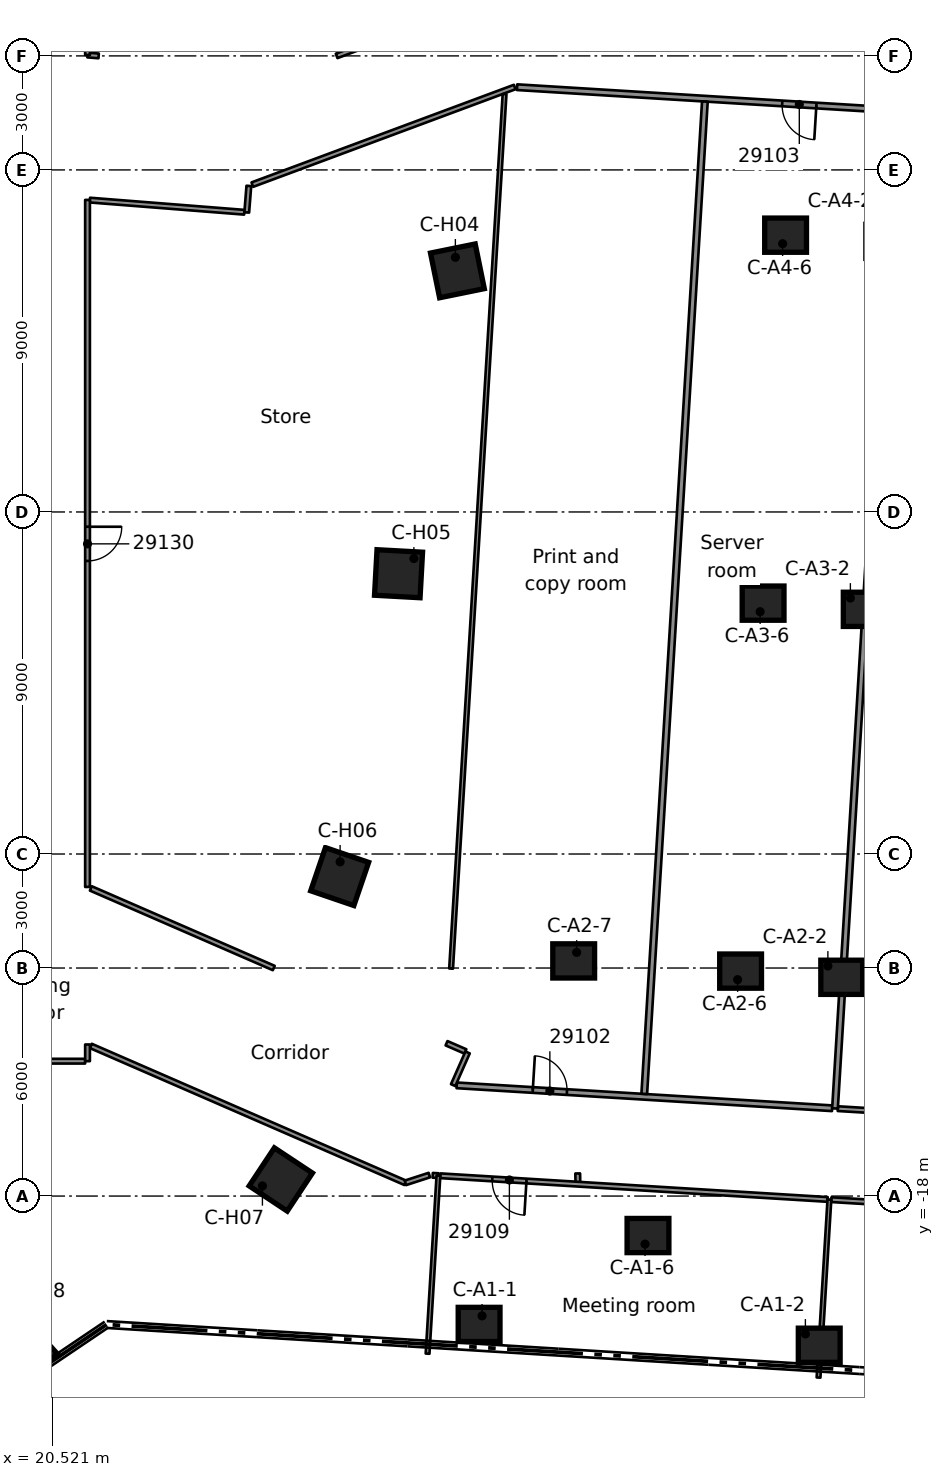
"""IFC4 building model, lengths in metres.
Left out: names, types, materials, properties, quantities, classifications, styles, units other than length and angle.
Written with IfcOpenShell. Run it as: python <this file> out.ifc"""

import sys

from ifc_helpers import new_model, si_unit, direction, frame, frame_2d, origin, origin_2d, place, context, subcontext, project, spatial, rectangle, extrude, element, fill, save


model = new_model("IFC4")
c1 = context("Model", 3, precision=1e-05, world=origin(), true_north=direction((0.0, 1.0)))
c2 = subcontext(c1, "Body", "Model", "MODEL_VIEW")
j1 = project(units=[si_unit("LENGTHUNIT", "METRE"), si_unit("PLANEANGLEUNIT", "RADIAN")], contexts=[c1])
p1 = place(None, origin())
s1 = spatial("IfcSite", under=j1, at=p1, CompositionType="ELEMENT")
p2 = place(p1, origin())
s2 = spatial("IfcBuilding", under=s1, at=p2, CompositionType="ELEMENT")
p3 = place(p2, frame((0.0, 0.0, 149.1)))
s3 = spatial("IfcBuildingStorey", under=s2, at=p3, CompositionType="ELEMENT", Elevation=149.1)
for number, where, z_axis, x_axis in (
    (1, (31.754, -21.378, 0.0), (0.0, 0.0, 1.0), (1.0, 0.0, 0.0)),
    (2, (40.704, -21.926, 0.0), (0.0, 0.0, 1.0), (1.0, 0.0, 0.0)),
    (3, (36.198, -19.039, 0.0), (0.0, 0.0, 1.0), (1.0, 0.0, 0.0)),
    (4, (41.296, -12.244, 0.0), (0.0, 0.0, 1.0), (1.0, 0.0, 0.0)),
    (5, (38.635, -12.081, 0.0), (0.0, 0.0, 1.0), (1.0, 0.0, 0.0)),
    (6, (34.243, -11.813, 0.0), (0.0, 0.0, 1.0), (1.0, 0.0, 0.0)),
    (7, (41.888, -2.562, 0.0), (0.0, 0.0, 1.0), (1.0, 0.0, 0.0)),
    (8, (39.227, -2.399, 0.0), (0.0, 0.0, 1.0), (1.0, 0.0, 0.0)),
    (9, (39.819, 7.283, 0.0), (0.0, 0.0, 1.0), (1.0, 0.0, 0.0)),
):
    element("IfcColumn", number, at=place(p3, frame(where, z_axis=z_axis, x_axis=x_axis)), inside=s3, PredefinedType="COLUMN", context=c2, shape_type="SweptSolid", body=[
        extrude(rectangle(XDim=1.1, YDim=0.9, at=origin_2d()), origin(), (0.0, 0.0, 1.0), 3.5),
    ])
for number, where, z_axis, x_axis in (
    (10, (31.183, 6.344, 0.0), (0.0, 0.0, 1.0), (0.98, 0.199, 0.0)),
    (11, (29.634, -1.625, 0.0), (0.0, 0.0, 1.0), (0.998, -0.055, 0.0)),
    (12, (28.085, -9.594, 0.0), (0.0, 0.0, 1.0), (0.946, -0.323, 0.0)),
    (13, (26.536, -17.564, 0.0), (0.0, 0.0, 1.0), (0.834, -0.552, 0.0)),
    (14, (19.806, -22.104, 0.0), (0.0, 0.0, 1.0), (0.667, -0.745, 0.0)),
):
    element("IfcColumn", number, at=place(p3, frame(where, z_axis=z_axis, x_axis=x_axis)), inside=s3, PredefinedType="COLUMN", context=c2, shape_type="SweptSolid", body=[
        extrude(rectangle(XDim=1.2, YDim=1.2, at=origin_2d()), origin(), (0.0, 0.0, 1.0), 3.5),
    ])
p4 = place(p3, frame((34.349, -17.405, 0.0), z_axis=(0.0, 0.0, 1.0), x_axis=(0.017313421844, -0.999850111479, 0.0)))
e15 = element("IfcWall", 15, at=p4, inside=s3, PredefinedType="PARTITIONING", context=c2, shape_type="SweptSolid", body=[
    extrude(rectangle(XDim=0.282, YDim=0.125, at=frame_2d((0.141, 0.0))), origin(), (0.0, 0.0, 1.0), 3.08),
])
p5 = place(p3, frame((21.537, -14.05, 0.0), z_axis=(0.0, 0.0, 1.0), x_axis=(0.916891955624, -0.399135492924, 0.0)))
e16 = element("IfcWall", 16, at=p5, inside=s3, PredefinedType="PARTITIONING", context=c2, shape_type="SweptSolid", body=[
    extrude(rectangle(XDim=9.027, YDim=0.125, at=frame_2d((4.514, 0.0))), origin(), (0.0, 0.0, 1.0), 3.08),
])
p6 = place(p3, frame((21.537, -9.905, 0.0), z_axis=(0.0, 0.0, 1.0), x_axis=(0.916934710252, -0.39903726284, 0.0)))
e17 = element("IfcWall", 17, at=p6, inside=s3, PredefinedType="PARTITIONING", context=c2, shape_type="SweptSolid", body=[
    extrude(rectangle(XDim=5.25, YDim=0.125, at=frame_2d((2.625, 0.0))), origin(), (0.0, 0.0, 1.0), 3.08),
])
p7 = place(p3, frame((30.897, -13.979, 0.0), z_axis=(0.0, 0.0, 1.0), x_axis=(0.917105858988, -0.398643755012, 0.0)))
e18 = element("IfcWall", 18, at=p7, inside=s3, PredefinedType="PARTITIONING", context=c2, shape_type="SweptSolid", body=[
    extrude(rectangle(XDim=0.542, YDim=0.125, at=frame_2d((0.271, 0.0))), origin(), (0.0, 0.0, 1.0), 3.08),
])
p8 = place(p3, frame((21.512, 8.206, 0.0), z_axis=(0.0, 0.0, 1.0), x_axis=(0.996912969239, -0.07851453218, 0.0)))
e19 = element("IfcWall", 19, at=p8, inside=s3, PredefinedType="PARTITIONING", context=c2, shape_type="SweptSolid", body=[
    extrude(rectangle(XDim=4.077, YDim=0.125, at=frame_2d((2.038, 0.0))), origin(), (0.0, 0.0, 1.0), 3.08),
])
p9 = place(p3, frame((21.45, 12.023, 0.0), z_axis=(0.0, 0.0, 1.0), x_axis=(0.996945992079, -0.078094102713, 0.0)))
e20 = element("IfcWall", 20, at=p9, inside=s3, PredefinedType="PARTITIONING", context=c2, shape_type="SweptSolid", body=[
    extrude(rectangle(XDim=0.294, YDim=0.125, at=frame_2d((0.147, 0.0))), origin(), (0.0, 0.0, 1.0), 3.08),
])
p10 = place(p3, frame((30.533, -17.454, 0.0), z_axis=(0.0, 0.0, 1.0), x_axis=(0.998313083069, -0.058060211616, 0.0)))
e21 = element("IfcWall", 21, at=p10, inside=s3, PredefinedType="PARTITIONING", context=c2, shape_type="SweptSolid", body=[
    extrude(rectangle(XDim=0.151, YDim=0.125, at=frame_2d((0.076, 0.0))), origin(), (0.0, 0.0, 1.0), 3.08),
])
p11 = place(p3, frame((41.022, -18.095, 0.0), z_axis=(0.0, 0.0, 1.0), x_axis=(0.9981427784, -0.060917927811, 0.0)))
e22 = element("IfcWall", 22, at=p11, inside=s3, PredefinedType="PARTITIONING", context=c2, shape_type="SweptSolid", body=[
    extrude(rectangle(XDim=1.447, YDim=0.125, at=frame_2d((0.723, 0.0))), origin(), (0.0, 0.0, 1.0), 3.08),
])
p12 = place(p3, frame((40.923, -18.089, 0.0), z_axis=(0.0, 0.0, 1.0), x_axis=(-0.998135704692, 0.06103372034, 0.0)))
e23 = element("IfcWall", 23, at=p12, inside=s3, PredefinedType="PARTITIONING", context=c2, shape_type="SweptSolid", body=[
    extrude(rectangle(XDim=10.208, YDim=0.125, at=frame_2d((5.104, 0.0))), origin(), (0.0, 0.0, 1.0), 3.08),
])
p13 = place(p12, frame((7.938, 0.0, 0.0)))
e24 = element("IfcOpeningElement", 24, at=p13, cuts=e23, PredefinedType="OPENING", context=c2, shape_type="SweptSolid", body=[
    extrude(rectangle(XDim=0.9, YDim=2.1, at=frame_2d((0.45, 1.05))), frame((0.0, 0.073, 0.0), z_axis=(0.0, -1.0, 0.0), x_axis=(1.0, 0.0, 0.0)), (0.0, 0.0, 1.0), 0.145),
])
p14 = place(p3, frame((41.194, -15.7, 0.0), z_axis=(0.0, 0.0, 1.0), x_axis=(0.998175067926, -0.060386536338, 0.0)))
e25 = element("IfcWall", 25, at=p14, inside=s3, PredefinedType="PARTITIONING", context=c2, shape_type="SweptSolid", body=[
    extrude(rectangle(XDim=1.358, YDim=0.125, at=frame_2d((0.679, 0.0))), origin(), (0.0, 0.0, 1.0), 3.08),
])
p15 = place(p3, frame((31.165, -15.087, 0.0), z_axis=(0.0, 0.0, 1.0), x_axis=(0.998142132741, -0.060928506027, 0.0)))
e26 = element("IfcWall", 26, at=p15, inside=s3, PredefinedType="PARTITIONING", context=c2, shape_type="SweptSolid", body=[
    extrude(rectangle(XDim=9.897, YDim=0.15, at=frame_2d((4.949, 0.0))), origin(), (0.0, 0.0, 1.0), 3.08),
])
p16 = place(p15, frame((2.006, 0.0, 0.0)))
e27 = element("IfcOpeningElement", 27, at=p16, cuts=e26, PredefinedType="OPENING", context=c2, shape_type="SweptSolid", body=[
    extrude(rectangle(XDim=0.9, YDim=2.1, at=frame_2d((0.45, 1.05))), frame((0.0, 0.085, 0.0), z_axis=(0.0, -1.0, 0.0), x_axis=(1.0, 0.0, 0.0)), (0.0, 0.0, 1.0), 0.17),
])
p17 = place(p3, frame((44.16, 10.478, 0.0), z_axis=(0.0, 0.0, 1.0), x_axis=(-0.998127894331, 0.061161315872, 0.0)))
e28 = element("IfcWall", 28, at=p17, inside=s3, PredefinedType="PARTITIONING", context=c2, shape_type="SweptSolid", body=[
    extrude(rectangle(XDim=11.428, YDim=0.15, at=frame_2d((5.714, 0.0))), origin(), (0.0, 0.0, 1.0), 3.08),
])
p18 = place(p17, frame((3.538, 0.0, 0.0)))
e29 = element("IfcOpeningElement", 29, at=p18, cuts=e28, PredefinedType="OPENING", context=c2, shape_type="SweptSolid", body=[
    extrude(rectangle(XDim=0.9, YDim=2.1, at=frame_2d((0.45, 1.05))), frame((0.0, 0.085, 0.0), z_axis=(0.0, -1.0, 0.0), x_axis=(1.0, 0.0, 0.0)), (0.0, 0.0, 1.0), 0.17),
])
p19 = place(p3, frame((21.387, -14.451, 0.0), z_axis=(0.0, 0.0, 1.0), x_axis=(-1.0, 0.0, 0.0)))
e30 = element("IfcWall", 30, at=p19, inside=s3, PredefinedType="PARTITIONING", context=c2, shape_type="SweptSolid", body=[
    extrude(rectangle(XDim=10.996, YDim=0.125, at=frame_2d((5.498, 0.0))), origin(), (0.0, 0.0, 1.0), 3.08),
])
p20 = place(p19, frame((5.038, 0.0, 0.0)))
e31 = element("IfcOpeningElement", 31, at=p20, cuts=e30, PredefinedType="OPENING", context=c2, shape_type="SweptSolid", body=[
    extrude(rectangle(XDim=0.9, YDim=2.1, at=frame_2d((0.45, 1.05))), frame((0.0, 0.073, 0.0), z_axis=(0.0, -1.0, 0.0), x_axis=(1.0, 0.0, 0.0)), (0.0, 0.0, 1.0), 0.145),
])
p21 = place(p3, frame((25.787, 8.613, 0.0), z_axis=(0.0, 0.0, 1.0), x_axis=(0.937265679677, 0.348615899952, 0.0)))
e32 = element("IfcWall", 32, at=p21, inside=s3, PredefinedType="PARTITIONING", context=c2, shape_type="SweptSolid", body=[
    extrude(rectangle(XDim=7.366, YDim=0.125, at=frame_2d((3.683, 0.0))), origin(), (0.0, 0.0, 1.0), 3.08),
])
p22 = place(p3, frame((28.005, 12.0, 0.0), z_axis=(0.0, 0.0, 1.0), x_axis=(0.937179389565, 0.348847806034, 0.0)))
e33 = element("IfcWall", 33, at=p22, inside=s3, PredefinedType="PARTITIONING", context=c2, shape_type="SweptSolid", body=[
    extrude(rectangle(XDim=3.541, YDim=0.125, at=frame_2d((1.77, 0.0))), origin(), (0.0, 0.0, 1.0), 3.08),
])
p23 = place(p3, frame((31.071, -15.081, 0.0), z_axis=(0.0, 0.0, 1.0), x_axis=(0.404017334041, 0.914751328938, 0.0)))
e34 = element("IfcWall", 34, at=p23, inside=s3, PredefinedType="PARTITIONING", context=c2, shape_type="SweptSolid", body=[
    extrude(rectangle(XDim=0.94, YDim=0.125, at=frame_2d((0.47, 0.0))), origin(), (0.0, 0.0, 1.0), 3.08),
])
p24 = place(p3, frame((29.814, -17.653, 0.0), z_axis=(0.0, 0.0, 1.0), x_axis=(0.951047586281, 0.30904447678, 0.0)))
e35 = element("IfcWall", 35, at=p24, inside=s3, PredefinedType="PARTITIONING", context=c2, shape_type="SweptSolid", body=[
    extrude(rectangle(XDim=0.664, YDim=0.125, at=frame_2d((0.332, 0.0))), origin(), (0.0, 0.0, 1.0), 3.08),
])
p25 = place(p3, frame((25.64, 7.881, 0.0), z_axis=(0.0, 0.0, 1.0), x_axis=(0.078802794934, 0.996890224403, 0.0)))
e36 = element("IfcWall", 36, at=p25, inside=s3, PredefinedType="PARTITIONING", context=c2, shape_type="SweptSolid", body=[
    extrude(rectangle(XDim=0.7, YDim=0.125, at=frame_2d((0.35, 0.0))), origin(), (0.0, 0.0, 1.0), 3.08),
])
p26 = place(p3, frame((40.686, -22.776, 0.0), z_axis=(0.0, 0.0, 1.0), x_axis=(0.060923886766, 0.998142414699, 0.0)))
e37 = element("IfcWall", 37, at=p26, inside=s3, PredefinedType="PARTITIONING", context=c2, shape_type="SweptSolid", body=[
    extrude(rectangle(XDim=4.693, YDim=0.1, at=frame_2d((2.346, 0.0))), origin(), (0.0, 0.0, 1.0), 3.08),
])
p27 = place(p3, frame((41.119, -15.695, 0.0), z_axis=(0.0, 0.0, 1.0), x_axis=(0.061026057913, 0.998136173203, 0.0)))
e38 = element("IfcWall", 38, at=p27, inside=s3, PredefinedType="PARTITIONING", context=c2, shape_type="SweptSolid", body=[
    extrude(rectangle(XDim=26.236, YDim=0.15, at=frame_2d((13.118, 0.0))), origin(), (0.0, 0.0, 1.0), 3.08),
])
p28 = place(p3, frame((36.1, -15.313, 0.0), z_axis=(0.0, 0.0, 1.0), x_axis=(0.060968133748, 0.998139713, 0.0)))
e39 = element("IfcWall", 39, at=p28, inside=s3, PredefinedType="PARTITIONING", context=c2, shape_type="SweptSolid", body=[
    extrude(rectangle(XDim=26.161, YDim=0.15, at=frame_2d((13.08, 0.0))), origin(), (0.0, 0.0, 1.0), 3.08),
])
p29 = place(p3, frame((30.398, -22.147, 0.0), z_axis=(0.0, 0.0, 1.0), x_axis=(0.060972554319, 0.998139442974, 0.0)))
e40 = element("IfcWall", 40, at=p29, inside=s3, PredefinedType="PARTITIONING", context=c2, shape_type="SweptSolid", body=[
    extrude(rectangle(XDim=4.693, YDim=0.1, at=frame_2d((2.346, 0.0))), origin(), (0.0, 0.0, 1.0), 3.08),
])
p30 = place(p3, frame((31.017, -12.015, 0.0), z_axis=(0.0, 0.0, 1.0), x_axis=(0.061035772494, 0.998135579206, 0.0)))
e41 = element("IfcWall", 41, at=p30, inside=s3, PredefinedType="PARTITIONING", context=c2, shape_type="SweptSolid", body=[
    extrude(rectangle(XDim=23.052, YDim=0.1, at=frame_2d((11.526, 0.0))), origin(), (0.0, 0.0, 1.0), 3.08),
])
p31 = place(p3, frame((21.45, -14.451, 0.0), z_axis=(0.0, 0.0, 1.0), x_axis=(0.0, 1.0, 0.0)))
e42 = element("IfcWall", 42, at=p31, inside=s3, PredefinedType="PARTITIONING", context=c2, shape_type="SweptSolid", body=[
    extrude(rectangle(XDim=0.439, YDim=0.125, at=frame_2d((0.219, 0.0))), origin(), (0.0, 0.0, 1.0), 3.08),
])
p32 = place(p3, frame((21.45, 8.211, 0.0), z_axis=(0.0, 0.0, 1.0), x_axis=(0.0, -1.0, 0.0)))
e43 = element("IfcWall", 43, at=p32, inside=s3, PredefinedType="PARTITIONING", context=c2, shape_type="SweptSolid", body=[
    extrude(rectangle(XDim=18.078, YDim=0.125, at=frame_2d((9.039, 0.0))), origin(), (0.0, 0.0, 1.0), 3.08),
])
p33 = place(p32, frame((8.6, 0.0, 0.0)))
e44 = element("IfcOpeningElement", 44, at=p33, cuts=e43, PredefinedType="OPENING", context=c2, shape_type="SweptSolid", body=[
    extrude(rectangle(XDim=0.9, YDim=2.1, at=frame_2d((0.45, 1.05))), frame((0.0, 0.073, 0.0), z_axis=(0.0, -1.0, 0.0), x_axis=(1.0, 0.0, 0.0)), (0.0, 0.0, 1.0), 0.145),
])
p34 = place(p3, frame((21.45, 12.023, 0.0), z_axis=(0.0, 0.0, 1.0), x_axis=(0.0, 1.0, 0.0)))
e45 = element("IfcWall", 45, at=p34, inside=s3, PredefinedType="PARTITIONING", context=c2, shape_type="SweptSolid", body=[
    extrude(rectangle(XDim=2.428, YDim=0.125, at=frame_2d((1.214, 0.0))), origin(), (0.0, 0.0, 1.0), 3.08),
])
p35 = place(p16, origin())
e46 = element("IfcDoor", 46, at=p35, inside=s3, OperationType="SINGLE_SWING_LEFT", PredefinedType="DOOR", context=c2, shape_type="SweptSolid", body=[
    extrude(rectangle(XDim=0.9, YDim=2.1, at=frame_2d((0.45, 1.05))), frame((0.0, 0.025, 0.0), z_axis=(0.0, -1.0, 0.0), x_axis=(1.0, 0.0, 0.0)), (0.0, 0.0, 1.0), 0.05),
])
fill(e27, e46)
p36 = place(p18, origin())
e47 = element("IfcDoor", 47, at=p36, inside=s3, OperationType="SINGLE_SWING_LEFT", PredefinedType="DOOR", context=c2, shape_type="SweptSolid", body=[
    extrude(rectangle(XDim=0.9, YDim=2.1, at=frame_2d((0.45, 1.05))), frame((0.0, 0.025, 0.0), z_axis=(0.0, -1.0, 0.0), x_axis=(1.0, 0.0, 0.0)), (0.0, 0.0, 1.0), 0.05),
])
fill(e29, e47)
p37 = place(p13, origin())
e48 = element("IfcDoor", 48, at=p37, inside=s3, OperationType="SINGLE_SWING_RIGHT", PredefinedType="DOOR", context=c2, shape_type="SweptSolid", body=[
    extrude(rectangle(XDim=0.9, YDim=2.1, at=frame_2d((0.45, 1.05))), frame((0.0, 0.025, 0.0), z_axis=(0.0, -1.0, 0.0), x_axis=(1.0, 0.0, 0.0)), (0.0, 0.0, 1.0), 0.05),
])
fill(e24, e48)
p38 = place(p33, origin())
e49 = element("IfcDoor", 49, at=p38, inside=s3, OperationType="SINGLE_SWING_RIGHT", PredefinedType="DOOR", context=c2, shape_type="SweptSolid", body=[
    extrude(rectangle(XDim=0.9, YDim=2.1, at=frame_2d((0.45, 1.05))), frame((0.0, 0.025, 0.0), z_axis=(0.0, -1.0, 0.0), x_axis=(1.0, 0.0, 0.0)), (0.0, 0.0, 1.0), 0.05),
])
fill(e44, e49)
save(model, sys.argv[1])
